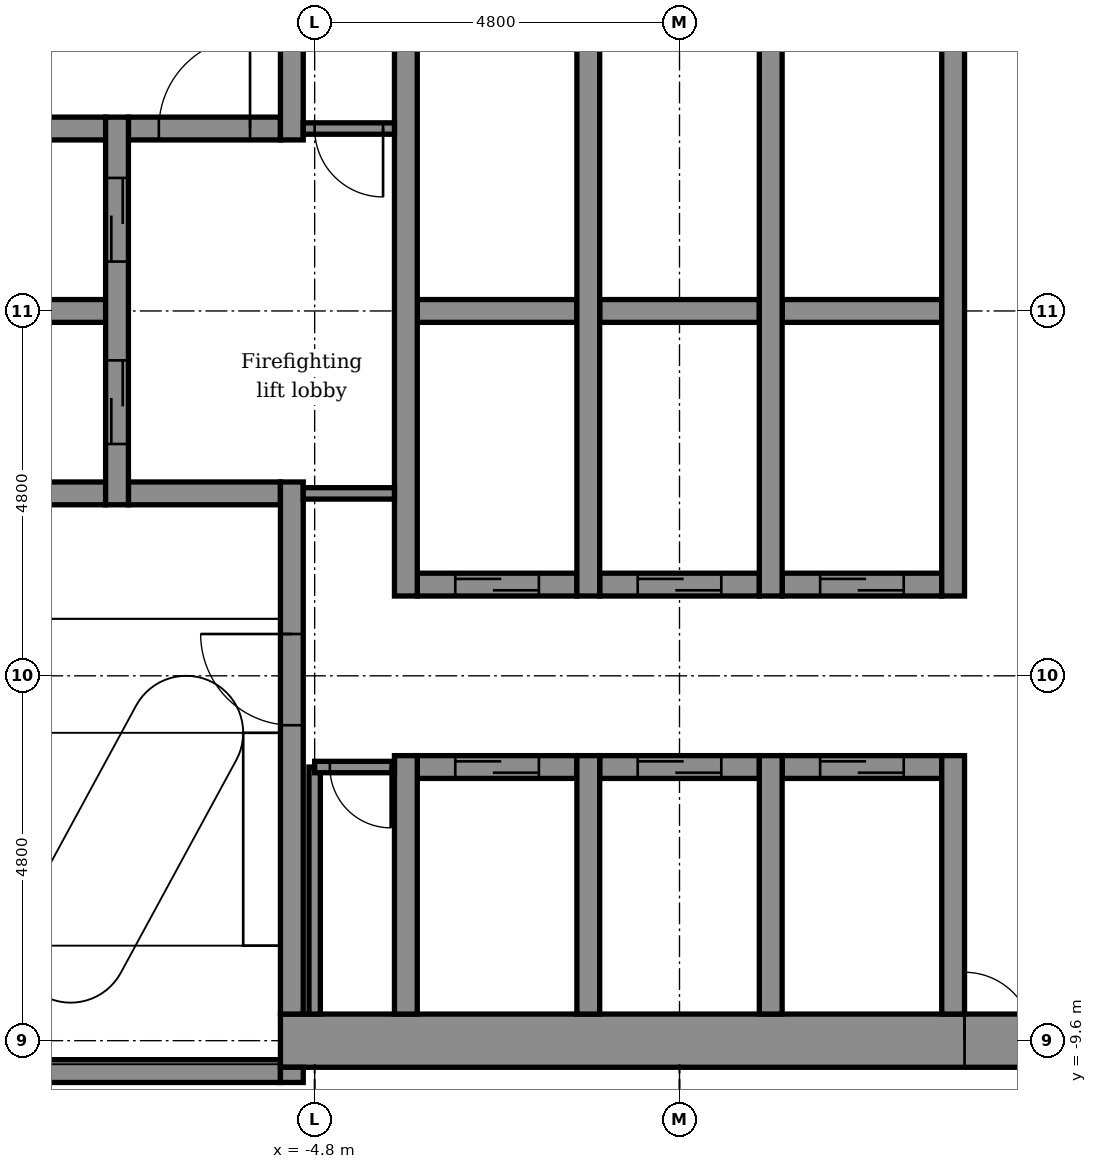
"""IFC4 building model, lengths in metres.
Left out: names, types, materials, properties, quantities, classifications, styles, units other than length and angle.
Written with IfcOpenShell. Run it as: python <this file> out.ifc"""

import sys

from ifc_helpers import new_model, si_unit, direction, frame, frame_2d, origin, place, context, subcontext, project, spatial, rectangle, extrude, element, fill, save


model = new_model("IFC4")
c1 = context("Model", 3, precision=1e-05, world=origin(), true_north=direction((0.0, 1.0)))
c2 = subcontext(c1, "Body", "Model", "MODEL_VIEW")
j1 = project(units=[si_unit("LENGTHUNIT", "METRE"), si_unit("PLANEANGLEUNIT", "RADIAN")], contexts=[c1])
p1 = place(None, origin())
s1 = spatial("IfcSite", under=j1, at=p1, CompositionType="ELEMENT")
p2 = place(p1, origin())
s2 = spatial("IfcBuilding", under=s1, at=p2, CompositionType="ELEMENT")
p3 = place(p2, frame((0.0, 0.0, 185.6)))
s3 = spatial("IfcBuildingStorey", under=s2, at=p3, CompositionType="ELEMENT", Elevation=185.6)
p4 = place(p3, frame((-9.25, -10.0, -0.15), z_axis=(0.0, 0.0, 1.0), x_axis=(1.0, 0.0, 0.0)))
e1 = element("IfcWall", 1, at=p4, inside=s3, PredefinedType="STANDARD", context=c2, shape_type="SweptSolid", body=[
    extrude(rectangle(XDim=4.0, YDim=0.3, at=frame_2d((2.0, 0.0))), origin(), (0.0, 0.0, 1.0), 3.9),
])
p5 = place(p3, frame((-5.25, -9.6, -0.15), z_axis=(0.0, 0.0, 1.0), x_axis=(1.0, 0.0, 0.0)))
e2 = element("IfcWall", 2, at=p5, inside=s3, PredefinedType="SHEAR", context=c2, shape_type="SweptSolid", body=[
    extrude(rectangle(XDim=10.2, YDim=0.7, at=frame_2d((5.1, 0.0))), origin(), (0.0, 0.0, 1.0), 3.9),
])
p6 = place(p5, frame((9.0, 0.0, 0.15)))
e3 = element("IfcOpeningElement", 3, at=p6, cuts=e2, PredefinedType="OPENING", context=c2, shape_type="SweptSolid", body=[
    extrude(rectangle(XDim=0.9, YDim=2.1, at=frame_2d((0.45, 1.05))), frame((0.0, 0.36, 0.0), z_axis=(0.0, -1.0, 0.0), x_axis=(1.0, 0.0, 0.0)), (0.0, 0.0, 1.0), 0.72),
])
p7 = place(p3, frame((-3.45, -6.0, -0.15), z_axis=(0.0, 0.0, 1.0), x_axis=(1.0, 0.0, 0.0)))
e4 = element("IfcWall", 4, at=p7, inside=s3, PredefinedType="STANDARD", context=c2, shape_type="SweptSolid", body=[
    extrude(rectangle(XDim=2.1, YDim=0.3, at=frame_2d((1.05, 0.0))), origin(), (0.0, 0.0, 1.0), 3.9),
])
p8 = place(p7, frame((0.5, 0.0, 0.15)))
e5 = element("IfcOpeningElement", 5, at=p8, cuts=e4, PredefinedType="OPENING", context=c2, shape_type="SweptSolid", body=[
    extrude(rectangle(XDim=1.1, YDim=2.1, at=frame_2d((0.55, 1.05))), frame((0.0, 0.16, 0.0), z_axis=(0.0, -1.0, 0.0), x_axis=(1.0, 0.0, 0.0)), (0.0, 0.0, 1.0), 0.32),
])
p9 = place(p3, frame((-1.05, -6.0, -0.15), z_axis=(0.0, 0.0, 1.0), x_axis=(1.0, 0.0, 0.0)))
e6 = element("IfcWall", 6, at=p9, inside=s3, PredefinedType="STANDARD", context=c2, shape_type="SweptSolid", body=[
    extrude(rectangle(XDim=2.1, YDim=0.3, at=frame_2d((1.05, 0.0))), origin(), (0.0, 0.0, 1.0), 3.9),
])
p10 = place(p9, frame((0.5, 0.0, 0.15)))
e7 = element("IfcOpeningElement", 7, at=p10, cuts=e6, PredefinedType="OPENING", context=c2, shape_type="SweptSolid", body=[
    extrude(rectangle(XDim=1.1, YDim=2.1, at=frame_2d((0.55, 1.05))), frame((0.0, 0.16, 0.0), z_axis=(0.0, -1.0, 0.0), x_axis=(1.0, 0.0, 0.0)), (0.0, 0.0, 1.0), 0.32),
])
p11 = place(p3, frame((1.35, -6.0, -0.15), z_axis=(0.0, 0.0, 1.0), x_axis=(1.0, 0.0, 0.0)))
e8 = element("IfcWall", 8, at=p11, inside=s3, PredefinedType="STANDARD", context=c2, shape_type="SweptSolid", body=[
    extrude(rectangle(XDim=2.1, YDim=0.3, at=frame_2d((1.05, 0.0))), origin(), (0.0, 0.0, 1.0), 3.9),
])
p12 = place(p11, frame((0.5, 0.0, 0.15)))
e9 = element("IfcOpeningElement", 9, at=p12, cuts=e8, PredefinedType="OPENING", context=c2, shape_type="SweptSolid", body=[
    extrude(rectangle(XDim=1.1, YDim=2.1, at=frame_2d((0.55, 1.05))), frame((0.0, 0.16, 0.0), z_axis=(0.0, -1.0, 0.0), x_axis=(1.0, 0.0, 0.0)), (0.0, 0.0, 1.0), 0.32),
])
p13 = place(p3, frame((-3.45, -3.6, -0.15), z_axis=(0.0, 0.0, 1.0), x_axis=(1.0, 0.0, 0.0)))
e10 = element("IfcWall", 10, at=p13, inside=s3, PredefinedType="STANDARD", context=c2, shape_type="SweptSolid", body=[
    extrude(rectangle(XDim=2.1, YDim=0.3, at=frame_2d((1.05, 0.0))), origin(), (0.0, 0.0, 1.0), 3.9),
])
p14 = place(p13, frame((0.5, 0.0, 0.15)))
e11 = element("IfcOpeningElement", 11, at=p14, cuts=e10, PredefinedType="OPENING", context=c2, shape_type="SweptSolid", body=[
    extrude(rectangle(XDim=1.1, YDim=2.1, at=frame_2d((0.55, 1.05))), frame((0.0, 0.16, 0.0), z_axis=(0.0, -1.0, 0.0), x_axis=(1.0, 0.0, 0.0)), (0.0, 0.0, 1.0), 0.32),
])
p15 = place(p3, frame((-1.05, -3.6, -0.15), z_axis=(0.0, 0.0, 1.0), x_axis=(1.0, 0.0, 0.0)))
e12 = element("IfcWall", 12, at=p15, inside=s3, PredefinedType="STANDARD", context=c2, shape_type="SweptSolid", body=[
    extrude(rectangle(XDim=2.1, YDim=0.3, at=frame_2d((1.05, 0.0))), origin(), (0.0, 0.0, 1.0), 3.9),
])
p16 = place(p15, frame((0.5, 0.0, 0.15)))
e13 = element("IfcOpeningElement", 13, at=p16, cuts=e12, PredefinedType="OPENING", context=c2, shape_type="SweptSolid", body=[
    extrude(rectangle(XDim=1.1, YDim=2.1, at=frame_2d((0.55, 1.05))), frame((0.0, 0.16, 0.0), z_axis=(0.0, -1.0, 0.0), x_axis=(1.0, 0.0, 0.0)), (0.0, 0.0, 1.0), 0.32),
])
p17 = place(p3, frame((1.35, -3.6, -0.15), z_axis=(0.0, 0.0, 1.0), x_axis=(1.0, 0.0, 0.0)))
e14 = element("IfcWall", 14, at=p17, inside=s3, PredefinedType="STANDARD", context=c2, shape_type="SweptSolid", body=[
    extrude(rectangle(XDim=2.1, YDim=0.3, at=frame_2d((1.05, 0.0))), origin(), (0.0, 0.0, 1.0), 3.9),
])
p18 = place(p17, frame((0.5, 0.0, 0.15)))
e15 = element("IfcOpeningElement", 15, at=p18, cuts=e14, PredefinedType="OPENING", context=c2, shape_type="SweptSolid", body=[
    extrude(rectangle(XDim=1.1, YDim=2.1, at=frame_2d((0.55, 1.05))), frame((0.0, 0.16, 0.0), z_axis=(0.0, -1.0, 0.0), x_axis=(1.0, 0.0, 0.0)), (0.0, 0.0, 1.0), 0.32),
])
p19 = place(p3, frame((-9.45, -2.4, -0.15), z_axis=(0.0, 0.0, 1.0), x_axis=(1.0, 0.0, 0.0)))
e16 = element("IfcWall", 16, at=p19, inside=s3, PredefinedType="STANDARD", context=c2, shape_type="SweptSolid", body=[
    extrude(rectangle(XDim=1.9, YDim=0.3, at=frame_2d((0.95, 0.0))), origin(), (0.0, 0.0, 1.0), 3.9),
])
p20 = place(p3, frame((-7.25, -2.4, -0.15), z_axis=(0.0, 0.0, 1.0), x_axis=(1.0, 0.0, 0.0)))
e17 = element("IfcWall", 17, at=p20, inside=s3, PredefinedType="STANDARD", context=c2, shape_type="SweptSolid", body=[
    extrude(rectangle(XDim=2.0, YDim=0.3, at=frame_2d((1.0, 0.0))), origin(), (0.0, 0.0, 1.0), 3.9),
])
p21 = place(p3, frame((-10.85, 0.0, -0.15), z_axis=(0.0, 0.0, 1.0), x_axis=(1.0, 0.0, 0.0)))
e18 = element("IfcWall", 18, at=p21, inside=s3, PredefinedType="STANDARD", context=c2, shape_type="SweptSolid", body=[
    extrude(rectangle(XDim=3.3, YDim=0.3, at=frame_2d((1.65, 0.0))), origin(), (0.0, 0.0, 1.0), 3.9),
])
p22 = place(p3, frame((-3.45, 0.0, -0.15), z_axis=(0.0, 0.0, 1.0), x_axis=(1.0, 0.0, 0.0)))
e19 = element("IfcWall", 19, at=p22, inside=s3, PredefinedType="STANDARD", context=c2, shape_type="SweptSolid", body=[
    extrude(rectangle(XDim=2.1, YDim=0.3, at=frame_2d((1.05, 0.0))), origin(), (0.0, 0.0, 1.0), 3.9),
])
p23 = place(p3, frame((-1.05, 0.0, -0.15), z_axis=(0.0, 0.0, 1.0), x_axis=(1.0, 0.0, 0.0)))
e20 = element("IfcWall", 20, at=p23, inside=s3, PredefinedType="STANDARD", context=c2, shape_type="SweptSolid", body=[
    extrude(rectangle(XDim=2.1, YDim=0.3, at=frame_2d((1.05, 0.0))), origin(), (0.0, 0.0, 1.0), 3.9),
])
p24 = place(p3, frame((1.35, 0.0, -0.15), z_axis=(0.0, 0.0, 1.0), x_axis=(1.0, 0.0, 0.0)))
e21 = element("IfcWall", 21, at=p24, inside=s3, PredefinedType="STANDARD", context=c2, shape_type="SweptSolid", body=[
    extrude(rectangle(XDim=2.1, YDim=0.3, at=frame_2d((1.05, 0.0))), origin(), (0.0, 0.0, 1.0), 3.9),
])
p25 = place(p3, frame((-9.45, 2.4, -0.15), z_axis=(0.0, 0.0, 1.0), x_axis=(1.0, 0.0, 0.0)))
e22 = element("IfcWall", 22, at=p25, inside=s3, PredefinedType="STANDARD", context=c2, shape_type="SweptSolid", body=[
    extrude(rectangle(XDim=1.9, YDim=0.3, at=frame_2d((0.95, 0.0))), origin(), (0.0, 0.0, 1.0), 3.9),
])
p26 = place(p3, frame((-7.25, 2.4, -0.15), z_axis=(0.0, 0.0, 1.0), x_axis=(1.0, 0.0, 0.0)))
e23 = element("IfcWall", 23, at=p26, inside=s3, PredefinedType="STANDARD", context=c2, shape_type="SweptSolid", body=[
    extrude(rectangle(XDim=2.0, YDim=0.3, at=frame_2d((1.0, 0.0))), origin(), (0.0, 0.0, 1.0), 3.9),
])
p27 = place(p26, frame((0.4, 0.0, 0.15)))
e24 = element("IfcOpeningElement", 24, at=p27, cuts=e23, PredefinedType="OPENING", context=c2, shape_type="SweptSolid", body=[
    extrude(rectangle(XDim=1.2, YDim=2.1, at=frame_2d((0.6, 1.05))), frame((0.0, 0.16, 0.0), z_axis=(0.0, -1.0, 0.0), x_axis=(1.0, 0.0, 0.0)), (0.0, 0.0, 1.0), 0.32),
])
p28 = place(p3, frame((-7.4, -2.55, -0.15), z_axis=(0.0, 0.0, 1.0), x_axis=(0.0, 1.0, 0.0)))
e25 = element("IfcWall", 25, at=p28, inside=s3, PredefinedType="STANDARD", context=c2, shape_type="SweptSolid", body=[
    extrude(rectangle(XDim=5.1, YDim=0.3, at=frame_2d((2.55, 0.0))), origin(), (0.0, 0.0, 1.0), 3.9),
])
p29 = place(p28, frame((0.8, 0.0, 0.15)))
e26 = element("IfcOpeningElement", 26, at=p29, cuts=e25, PredefinedType="OPENING", context=c2, shape_type="SweptSolid", body=[
    extrude(rectangle(XDim=1.1, YDim=2.1, at=frame_2d((0.55, 1.05))), frame((0.0, 0.16, 0.0), z_axis=(0.0, -1.0, 0.0), x_axis=(1.0, 0.0, 0.0)), (0.0, 0.0, 1.0), 0.32),
])
p30 = place(p28, frame((3.2, 0.0, 0.15)))
e27 = element("IfcOpeningElement", 27, at=p30, cuts=e25, PredefinedType="OPENING", context=c2, shape_type="SweptSolid", body=[
    extrude(rectangle(XDim=1.1, YDim=2.1, at=frame_2d((0.55, 1.05))), frame((0.0, 0.16, 0.0), z_axis=(0.0, -1.0, 0.0), x_axis=(1.0, 0.0, 0.0)), (0.0, 0.0, 1.0), 0.32),
])
p31 = place(p3, frame((-5.1, -10.15, -0.15), z_axis=(0.0, 0.0, 1.0), x_axis=(0.0, 1.0, 0.0)))
e28 = element("IfcWall", 28, at=p31, inside=s3, PredefinedType="STANDARD", context=c2, shape_type="SweptSolid", body=[
    extrude(rectangle(XDim=0.2, YDim=0.3, at=frame_2d((0.1, 0.0))), origin(), (0.0, 0.0, 1.0), 3.9),
])
p32 = place(p3, frame((-5.1, -9.25, -0.15), z_axis=(0.0, 0.0, 1.0), x_axis=(0.0, 1.0, 0.0)))
e29 = element("IfcWall", 29, at=p32, inside=s3, PredefinedType="STANDARD", context=c2, shape_type="SweptSolid", body=[
    extrude(rectangle(XDim=7.0, YDim=0.3, at=frame_2d((3.5, 0.0))), origin(), (0.0, 0.0, 1.0), 3.9),
])
p33 = place(p32, frame((3.8, 0.0, 0.15)))
e30 = element("IfcOpeningElement", 30, at=p33, cuts=e29, PredefinedType="OPENING", context=c2, shape_type="SweptSolid", body=[
    extrude(rectangle(XDim=1.2, YDim=2.1, at=frame_2d((0.6, 1.05))), frame((0.0, 0.16, 0.0), z_axis=(0.0, -1.0, 0.0), x_axis=(1.0, 0.0, 0.0)), (0.0, 0.0, 1.0), 0.32),
])
p34 = place(p3, frame((-5.1, 2.25, -0.15), z_axis=(0.0, 0.0, 1.0), x_axis=(0.0, 1.0, 0.0)))
e31 = element("IfcWall", 31, at=p34, inside=s3, PredefinedType="STANDARD", context=c2, shape_type="SweptSolid", body=[
    extrude(rectangle(XDim=7.0, YDim=0.3, at=frame_2d((3.5, 0.0))), origin(), (0.0, 0.0, 1.0), 3.9),
])
p35 = place(p34, frame((2.0, 0.0, 0.15)))
e32 = element("IfcOpeningElement", 32, at=p35, cuts=e31, PredefinedType="OPENING", context=c2, shape_type="SweptSolid", body=[
    extrude(rectangle(XDim=1.2, YDim=2.1, at=frame_2d((0.6, 1.05))), frame((0.0, 0.16, 0.0), z_axis=(0.0, -1.0, 0.0), x_axis=(1.0, 0.0, 0.0)), (0.0, 0.0, 1.0), 0.32),
])
p36 = place(p3, frame((-3.6, -9.25, -0.15), z_axis=(0.0, 0.0, 1.0), x_axis=(0.0, 1.0, 0.0)))
e33 = element("IfcWall", 33, at=p36, inside=s3, PredefinedType="STANDARD", context=c2, shape_type="SweptSolid", body=[
    extrude(rectangle(XDim=3.4, YDim=0.3, at=frame_2d((1.7, 0.0))), origin(), (0.0, 0.0, 1.0), 3.9),
])
p37 = place(p3, frame((-3.6, -3.75, -0.15), z_axis=(0.0, 0.0, 1.0), x_axis=(0.0, 1.0, 0.0)))
e34 = element("IfcWall", 34, at=p37, inside=s3, PredefinedType="STANDARD", context=c2, shape_type="SweptSolid", body=[
    extrude(rectangle(XDim=7.5, YDim=0.3, at=frame_2d((3.75, 0.0))), origin(), (0.0, 0.0, 1.0), 3.9),
])
p38 = place(p3, frame((-1.2, -9.25, -0.15), z_axis=(0.0, 0.0, 1.0), x_axis=(0.0, 1.0, 0.0)))
e35 = element("IfcWall", 35, at=p38, inside=s3, PredefinedType="STANDARD", context=c2, shape_type="SweptSolid", body=[
    extrude(rectangle(XDim=3.4, YDim=0.3, at=frame_2d((1.7, 0.0))), origin(), (0.0, 0.0, 1.0), 3.9),
])
p39 = place(p3, frame((-1.2, -3.75, -0.15), z_axis=(0.0, 0.0, 1.0), x_axis=(0.0, 1.0, 0.0)))
e36 = element("IfcWall", 36, at=p39, inside=s3, PredefinedType="STANDARD", context=c2, shape_type="SweptSolid", body=[
    extrude(rectangle(XDim=7.5, YDim=0.3, at=frame_2d((3.75, 0.0))), origin(), (0.0, 0.0, 1.0), 3.9),
])
p40 = place(p3, frame((1.2, -9.25, -0.15), z_axis=(0.0, 0.0, 1.0), x_axis=(0.0, 1.0, 0.0)))
e37 = element("IfcWall", 37, at=p40, inside=s3, PredefinedType="STANDARD", context=c2, shape_type="SweptSolid", body=[
    extrude(rectangle(XDim=3.4, YDim=0.3, at=frame_2d((1.7, 0.0))), origin(), (0.0, 0.0, 1.0), 3.9),
])
p41 = place(p3, frame((1.2, -3.75, -0.15), z_axis=(0.0, 0.0, 1.0), x_axis=(0.0, 1.0, 0.0)))
e38 = element("IfcWall", 38, at=p41, inside=s3, PredefinedType="STANDARD", context=c2, shape_type="SweptSolid", body=[
    extrude(rectangle(XDim=7.5, YDim=0.3, at=frame_2d((3.75, 0.0))), origin(), (0.0, 0.0, 1.0), 3.9),
])
p42 = place(p3, frame((3.6, -9.25, -0.15), z_axis=(0.0, 0.0, 1.0), x_axis=(0.0, 1.0, 0.0)))
e39 = element("IfcWall", 39, at=p42, inside=s3, PredefinedType="STANDARD", context=c2, shape_type="SweptSolid", body=[
    extrude(rectangle(XDim=3.4, YDim=0.3, at=frame_2d((1.7, 0.0))), origin(), (0.0, 0.0, 1.0), 3.9),
])
p43 = place(p3, frame((3.6, -3.75, -0.15), z_axis=(0.0, 0.0, 1.0), x_axis=(0.0, 1.0, 0.0)))
e40 = element("IfcWall", 40, at=p43, inside=s3, PredefinedType="STANDARD", context=c2, shape_type="SweptSolid", body=[
    extrude(rectangle(XDim=7.5, YDim=0.3, at=frame_2d((3.75, 0.0))), origin(), (0.0, 0.0, 1.0), 3.9),
])
p44 = place(p3, frame((-4.8, -9.25, 0.0), z_axis=(0.0, 0.0, 1.0), x_axis=(0.0, 1.0, 0.0)))
e41 = element("IfcWall", 41, at=p44, inside=s3, PredefinedType="PARTITIONING", context=c2, shape_type="SweptSolid", body=[
    extrude(rectangle(XDim=3.25, YDim=0.15, at=frame_2d((1.625, 0.0))), origin(), (0.0, 0.0, 1.0), 3.75),
])
p45 = place(p3, frame((-4.8, -6.0, 0.0), z_axis=(0.0, 0.0, 1.0), x_axis=(1.0, 0.0, 0.0)))
e42 = element("IfcWall", 42, at=p45, inside=s3, PredefinedType="PARTITIONING", context=c2, shape_type="SweptSolid", body=[
    extrude(rectangle(XDim=1.05, YDim=0.15, at=frame_2d((0.525, 0.0))), origin(), (0.0, 0.0, 1.0), 3.75),
])
p46 = place(p45, frame((0.2, 0.0, 0.0)))
e43 = element("IfcOpeningElement", 43, at=p46, cuts=e42, PredefinedType="OPENING", context=c2, shape_type="SweptSolid", body=[
    extrude(rectangle(XDim=0.8, YDim=2.1, at=frame_2d((0.4, 1.05))), frame((0.0, 0.085, 0.0), z_axis=(0.0, -1.0, 0.0), x_axis=(1.0, 0.0, 0.0)), (0.0, 0.0, 1.0), 0.17),
])
p47 = place(p3, frame((-4.95, 2.4, 0.0), z_axis=(0.0, 0.0, 1.0), x_axis=(1.0, 0.0, 0.0)))
e44 = element("IfcWall", 44, at=p47, inside=s3, PredefinedType="PARTITIONING", context=c2, shape_type="SweptSolid", body=[
    extrude(rectangle(XDim=1.2, YDim=0.15, at=frame_2d((0.6, 0.0))), origin(), (0.0, 0.0, 1.0), 3.75),
])
p48 = place(p47, frame((0.15, 0.0, 0.0)))
e45 = element("IfcOpeningElement", 45, at=p48, cuts=e44, PredefinedType="OPENING", context=c2, shape_type="SweptSolid", body=[
    extrude(rectangle(XDim=0.9, YDim=2.1, at=frame_2d((0.45, 1.05))), frame((0.0, 0.085, 0.0), z_axis=(0.0, -1.0, 0.0), x_axis=(1.0, 0.0, 0.0)), (0.0, 0.0, 1.0), 0.17),
])
p49 = place(p3, frame((-4.95, -2.4, 0.0), z_axis=(0.0, 0.0, 1.0), x_axis=(1.0, 0.0, 0.0)))
e46 = element("IfcWall", 46, at=p49, inside=s3, PredefinedType="PARTITIONING", context=c2, shape_type="SweptSolid", body=[
    extrude(rectangle(XDim=1.2, YDim=0.15, at=frame_2d((0.6, 0.0))), origin(), (0.0, 0.0, 1.0), 3.75),
])
p50 = place(p46, frame((0.8, 0.0, 0.0), z_axis=(0.0, 0.0, 1.0), x_axis=(-1.0, 0.0, 0.0)))
e47 = element("IfcDoor", 47, at=p50, inside=s3, OperationType="SINGLE_SWING_RIGHT", PredefinedType="DOOR", context=c2, shape_type="SweptSolid", body=[
    extrude(rectangle(XDim=0.8, YDim=2.1, at=frame_2d((0.4, 1.05))), frame((0.0, 0.025, 0.0), z_axis=(0.0, -1.0, 0.0), x_axis=(1.0, 0.0, 0.0)), (0.0, 0.0, 1.0), 0.05),
])
fill(e43, e47)
p51 = place(p29, origin())
e48 = element("IfcDoor", 48, at=p51, inside=s3, OperationType="DOUBLE_DOOR_SLIDING", PredefinedType="DOOR", context=c2, shape_type="SweptSolid", body=[
    extrude(rectangle(XDim=1.1, YDim=2.1, at=frame_2d((0.55, 1.05))), frame((0.0, 0.025, 0.0), z_axis=(0.0, -1.0, 0.0), x_axis=(1.0, 0.0, 0.0)), (0.0, 0.0, 1.0), 0.05),
])
fill(e26, e48)
p52 = place(p30, origin())
e49 = element("IfcDoor", 49, at=p52, inside=s3, OperationType="DOUBLE_DOOR_SLIDING", PredefinedType="DOOR", context=c2, shape_type="SweptSolid", body=[
    extrude(rectangle(XDim=1.1, YDim=2.1, at=frame_2d((0.55, 1.05))), frame((0.0, 0.025, 0.0), z_axis=(0.0, -1.0, 0.0), x_axis=(1.0, 0.0, 0.0)), (0.0, 0.0, 1.0), 0.05),
])
fill(e27, e49)
p53 = place(p14, origin())
e50 = element("IfcDoor", 50, at=p53, inside=s3, OperationType="DOUBLE_DOOR_SLIDING", PredefinedType="DOOR", context=c2, shape_type="SweptSolid", body=[
    extrude(rectangle(XDim=1.1, YDim=2.1, at=frame_2d((0.55, 1.05))), frame((0.0, 0.025, 0.0), z_axis=(0.0, -1.0, 0.0), x_axis=(1.0, 0.0, 0.0)), (0.0, 0.0, 1.0), 0.05),
])
fill(e11, e50)
p54 = place(p16, origin())
e51 = element("IfcDoor", 51, at=p54, inside=s3, OperationType="DOUBLE_DOOR_SLIDING", PredefinedType="DOOR", context=c2, shape_type="SweptSolid", body=[
    extrude(rectangle(XDim=1.1, YDim=2.1, at=frame_2d((0.55, 1.05))), frame((0.0, 0.025, 0.0), z_axis=(0.0, -1.0, 0.0), x_axis=(1.0, 0.0, 0.0)), (0.0, 0.0, 1.0), 0.05),
])
fill(e13, e51)
p55 = place(p18, origin())
e52 = element("IfcDoor", 52, at=p55, inside=s3, OperationType="DOUBLE_DOOR_SLIDING", PredefinedType="DOOR", context=c2, shape_type="SweptSolid", body=[
    extrude(rectangle(XDim=1.1, YDim=2.1, at=frame_2d((0.55, 1.05))), frame((0.0, 0.025, 0.0), z_axis=(0.0, -1.0, 0.0), x_axis=(1.0, 0.0, 0.0)), (0.0, 0.0, 1.0), 0.05),
])
fill(e15, e52)
p56 = place(p8, origin())
e53 = element("IfcDoor", 53, at=p56, inside=s3, OperationType="DOUBLE_DOOR_SLIDING", PredefinedType="DOOR", context=c2, shape_type="SweptSolid", body=[
    extrude(rectangle(XDim=1.1, YDim=2.1, at=frame_2d((0.55, 1.05))), frame((0.0, 0.025, 0.0), z_axis=(0.0, -1.0, 0.0), x_axis=(1.0, 0.0, 0.0)), (0.0, 0.0, 1.0), 0.05),
])
fill(e5, e53)
p57 = place(p10, origin())
e54 = element("IfcDoor", 54, at=p57, inside=s3, OperationType="DOUBLE_DOOR_SLIDING", PredefinedType="DOOR", context=c2, shape_type="SweptSolid", body=[
    extrude(rectangle(XDim=1.1, YDim=2.1, at=frame_2d((0.55, 1.05))), frame((0.0, 0.025, 0.0), z_axis=(0.0, -1.0, 0.0), x_axis=(1.0, 0.0, 0.0)), (0.0, 0.0, 1.0), 0.05),
])
fill(e7, e54)
p58 = place(p12, origin())
e55 = element("IfcDoor", 55, at=p58, inside=s3, OperationType="DOUBLE_DOOR_SLIDING", PredefinedType="DOOR", context=c2, shape_type="SweptSolid", body=[
    extrude(rectangle(XDim=1.1, YDim=2.1, at=frame_2d((0.55, 1.05))), frame((0.0, 0.025, 0.0), z_axis=(0.0, -1.0, 0.0), x_axis=(1.0, 0.0, 0.0)), (0.0, 0.0, 1.0), 0.05),
])
fill(e9, e55)
p59 = place(p33, origin())
e56 = element("IfcDoor", 56, at=p59, inside=s3, OperationType="SINGLE_SWING_RIGHT", PredefinedType="DOOR", context=c2, shape_type="SweptSolid", body=[
    extrude(rectangle(XDim=1.2, YDim=2.1, at=frame_2d((0.6, 1.05))), frame((0.0, 0.025, 0.0), z_axis=(0.0, -1.0, 0.0), x_axis=(1.0, 0.0, 0.0)), (0.0, 0.0, 1.0), 0.05),
])
fill(e30, e56)
p60 = place(p6, origin())
e57 = element("IfcDoor", 57, at=p60, inside=s3, OperationType="SINGLE_SWING_LEFT", PredefinedType="DOOR", context=c2, shape_type="SweptSolid", body=[
    extrude(rectangle(XDim=0.9, YDim=2.1, at=frame_2d((0.45, 1.05))), frame((0.0, 0.025, 0.0), z_axis=(0.0, -1.0, 0.0), x_axis=(1.0, 0.0, 0.0)), (0.0, 0.0, 1.0), 0.05),
])
fill(e3, e57)
p61 = place(p48, frame((0.9, 0.0, 0.0), z_axis=(0.0, 0.0, 1.0), x_axis=(-1.0, 0.0, 0.0)))
e58 = element("IfcDoor", 58, at=p61, inside=s3, OperationType="SINGLE_SWING_RIGHT", PredefinedType="DOOR", context=c2, shape_type="SweptSolid", body=[
    extrude(rectangle(XDim=0.9, YDim=2.1, at=frame_2d((0.45, 1.05))), frame((0.0, 0.025, 0.0), z_axis=(0.0, -1.0, 0.0), x_axis=(1.0, 0.0, 0.0)), (0.0, 0.0, 1.0), 0.05),
])
fill(e45, e58)
p62 = place(p27, origin())
e59 = element("IfcDoor", 59, at=p62, inside=s3, OperationType="SINGLE_SWING_RIGHT", PredefinedType="DOOR", context=c2, shape_type="SweptSolid", body=[
    extrude(rectangle(XDim=1.2, YDim=2.1, at=frame_2d((0.6, 1.05))), frame((0.0, 0.025, 0.0), z_axis=(0.0, -1.0, 0.0), x_axis=(1.0, 0.0, 0.0)), (0.0, 0.0, 1.0), 0.05),
])
fill(e24, e59)
save(model, sys.argv[1])
